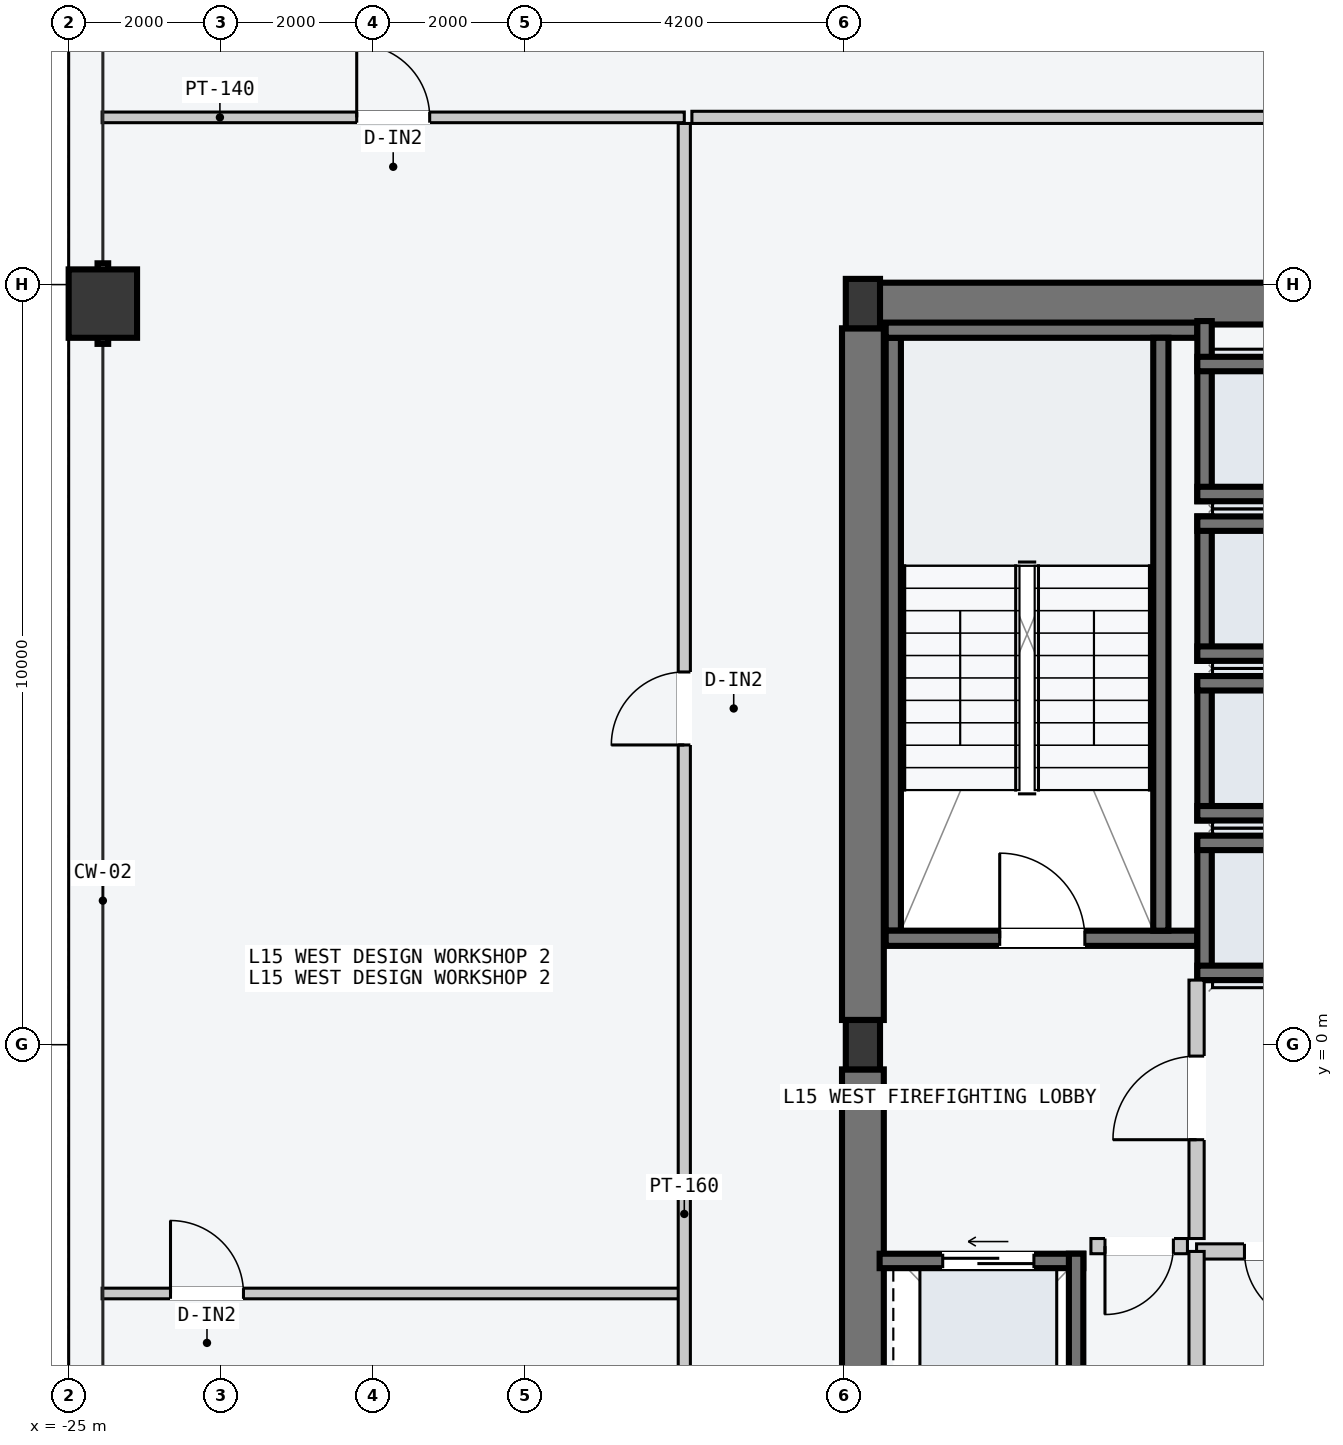
"""IFC4 building model, lengths in metres.
Left out: names, types, materials, properties, quantities, classifications, styles, units other than length and angle.
Written with IfcOpenShell. Run it as: python <this file> out.ifc"""

import sys

from ifc_helpers import new_model, si_unit, direction, frame, frame_2d, origin, origin_2d, place, context, subcontext, project, spatial, rectangle, hollow_rectangle, i_section, extrude, element, fill, save


model = new_model("IFC4")
c1 = context("Model", 3, precision=1e-05, world=origin(), true_north=direction((0.0, 1.0)))
c2 = subcontext(c1, "Body", "Model", "MODEL_VIEW")
j1 = project(units=[si_unit("LENGTHUNIT", "METRE"), si_unit("PLANEANGLEUNIT", "RADIAN")], contexts=[c1])
p1 = place(None, origin())
s1 = spatial("IfcSite", under=j1, at=p1, CompositionType="ELEMENT")
p2 = place(p1, origin())
s2 = spatial("IfcBuilding", under=s1, at=p2, CompositionType="ELEMENT")
p3 = place(p2, frame((0.0, 0.0, 60.0)))
s3 = spatial("IfcBuildingStorey", under=s2, at=p3, CompositionType="ELEMENT", Elevation=60.0)
p4 = place(p3, frame((-14.53, 9.75, -0.2), z_axis=(0.0, 0.0, 1.0), x_axis=(1.0, 0.0, 0.0)))
e1 = element("IfcWall", 1, at=p4, inside=s3, PredefinedType="SHEAR", context=c2, shape_type="SweptSolid", body=[
    extrude(rectangle(XDim=6.46, YDim=0.55, at=frame_2d((3.23, 0.0))), origin(), (0.0, 0.0, 1.0), 3.6),
])
for number, where, z_axis, x_axis in (
    (2, (-14.55, -9.425, -0.2), (0.0, 0.0, 1.0), (0.0, 1.0, 0.0)),
    (3, (-14.55, 0.325, -0.2), (0.0, 0.0, 1.0), (0.0, 1.0, 0.0)),
):
    element("IfcWall", number, at=place(p3, frame(where, z_axis=z_axis, x_axis=x_axis)), inside=s3, PredefinedType="SHEAR", context=c2, shape_type="SweptSolid", body=[
        extrude(rectangle(XDim=9.1, YDim=0.55, at=frame_2d((4.55, 0.0))), origin(), (0.0, 0.0, 1.0), 3.6),
    ])
p5 = place(p3, frame((-14.15, 1.5, -0.2), z_axis=(0.0, 0.0, 1.0), x_axis=(0.0, 1.0, 0.0)))
e4 = element("IfcWall", 4, at=p5, inside=s3, PredefinedType="SOLIDWALL", context=c2, shape_type="SweptSolid", body=[
    extrude(rectangle(XDim=7.8, YDim=0.2, at=frame_2d((3.9, 0.0))), origin(), (0.0, 0.0, 1.0), 3.6),
])
p6 = place(p3, frame((-14.25, 1.4, -0.2), z_axis=(0.0, 0.0, 1.0), x_axis=(1.0, 0.0, 0.0)))
e5 = element("IfcWall", 5, at=p6, inside=s3, PredefinedType="SOLIDWALL", context=c2, shape_type="SweptSolid", body=[
    extrude(rectangle(XDim=4.1, YDim=0.2, at=frame_2d((2.05, 0.0))), origin(), (0.0, 0.0, 1.0), 3.6),
])
p7 = place(p6, frame((1.5, 0.0, 0.2)))
e6 = element("IfcOpeningElement", 6, at=p7, cuts=e5, PredefinedType="OPENING", context=c2, shape_type="SweptSolid", body=[
    extrude(rectangle(XDim=1.12, YDim=2.18, at=frame_2d((0.56, 1.09))), frame((0.0, 0.11, 0.0), z_axis=(0.0, -1.0, 0.0), x_axis=(1.0, 0.0, 0.0)), (0.0, 0.0, 1.0), 0.22),
])
p8 = place(p3, frame((-14.25, 9.4, -0.2), z_axis=(0.0, 0.0, 1.0), x_axis=(1.0, 0.0, 0.0)))
e7 = element("IfcWall", 7, at=p8, inside=s3, PredefinedType="SOLIDWALL", context=c2, shape_type="SweptSolid", body=[
    extrude(rectangle(XDim=4.1, YDim=0.2, at=frame_2d((2.05, 0.0))), origin(), (0.0, 0.0, 1.0), 3.6),
])
p9 = place(p3, frame((-10.63, 1.5, -0.2), z_axis=(0.0, 0.0, 1.0), x_axis=(0.0, 1.0, 0.0)))
e8 = element("IfcWall", 8, at=p9, inside=s3, PredefinedType="SOLIDWALL", context=c2, shape_type="SweptSolid", body=[
    extrude(rectangle(XDim=7.8, YDim=0.2, at=frame_2d((3.9, 0.0))), origin(), (0.0, 0.0, 1.0), 3.6),
])
for number, where, z_axis, x_axis in (
    (9, (-14.55, 0.0, 0.0), (0.0, 0.0, 1.0), (1.0, 0.0, 0.0)),
    (10, (-14.55, 9.75, 0.0), (0.0, 0.0, 1.0), (1.0, 0.0, 0.0)),
):
    element("IfcColumn", number, at=place(p3, frame(where, z_axis=z_axis, x_axis=x_axis)), inside=s3, PredefinedType="COLUMN", context=c2, shape_type="SweptSolid", body=[
        extrude(i_section(OverallWidth=0.45, OverallDepth=0.65, WebThickness=0.025, FlangeThickness=0.04, at=origin_2d()), origin(), (0.0, 0.0, 1.0), 3.6),
    ])
p10 = place(p3, frame((-24.55, 9.75, 0.0), z_axis=(0.0, 0.0, 1.0), x_axis=(0.0, 1.0, 0.0)))
e11 = element("IfcColumn", 11, at=p10, inside=s3, PredefinedType="COLUMN", context=c2, shape_type="SweptSolid", body=[
    extrude(hollow_rectangle(XDim=0.9, YDim=0.9, WallThickness=0.045, at=origin_2d()), origin(), (0.0, 0.0, 1.0), 3.6),
])
p11 = place(p3, frame((-10.055, 0.85, -0.2), z_axis=(0.0, 0.0, 1.0), x_axis=(0.0, 1.0, 0.0)))
e12 = element("IfcWall", 12, at=p11, inside=s3, PredefinedType="SOLIDWALL", context=c2, shape_type="SweptSolid", body=[
    extrude(rectangle(XDim=1.9, YDim=0.19, at=frame_2d((0.95, 0.0))), origin(), (0.0, 0.0, 1.0), 3.6),
])
for number, where, z_axis, x_axis in (
    (13, (-10.15, 2.655, -0.2), (0.0, 0.0, 1.0), (1.0, 0.0, 0.0)),
    (14, (-10.15, 0.945, -0.2), (0.0, 0.0, 1.0), (1.0, 0.0, 0.0)),
):
    element("IfcWall", number, at=place(p3, frame(where, z_axis=z_axis, x_axis=x_axis)), inside=s3, PredefinedType="SOLIDWALL", context=c2, shape_type="SweptSolid", body=[
        extrude(rectangle(XDim=2.2, YDim=0.19, at=frame_2d((1.1, 0.0))), origin(), (0.0, 0.0, 1.0), 3.6),
    ])
p12 = place(p3, frame((-10.055, 2.95, -0.2), z_axis=(0.0, 0.0, 1.0), x_axis=(0.0, 1.0, 0.0)))
e15 = element("IfcWall", 15, at=p12, inside=s3, PredefinedType="SOLIDWALL", context=c2, shape_type="SweptSolid", body=[
    extrude(rectangle(XDim=1.9, YDim=0.19, at=frame_2d((0.95, 0.0))), origin(), (0.0, 0.0, 1.0), 3.6),
])
for number, where, z_axis, x_axis in (
    (16, (-10.15, 4.755, -0.2), (0.0, 0.0, 1.0), (1.0, 0.0, 0.0)),
    (17, (-10.15, 3.045, -0.2), (0.0, 0.0, 1.0), (1.0, 0.0, 0.0)),
):
    element("IfcWall", number, at=place(p3, frame(where, z_axis=z_axis, x_axis=x_axis)), inside=s3, PredefinedType="SOLIDWALL", context=c2, shape_type="SweptSolid", body=[
        extrude(rectangle(XDim=2.2, YDim=0.19, at=frame_2d((1.1, 0.0))), origin(), (0.0, 0.0, 1.0), 3.6),
    ])
p13 = place(p3, frame((-10.055, 5.05, -0.2), z_axis=(0.0, 0.0, 1.0), x_axis=(0.0, 1.0, 0.0)))
e18 = element("IfcWall", 18, at=p13, inside=s3, PredefinedType="SOLIDWALL", context=c2, shape_type="SweptSolid", body=[
    extrude(rectangle(XDim=1.9, YDim=0.19, at=frame_2d((0.95, 0.0))), origin(), (0.0, 0.0, 1.0), 3.6),
])
for number, where, z_axis, x_axis in (
    (19, (-10.15, 6.855, -0.2), (0.0, 0.0, 1.0), (1.0, 0.0, 0.0)),
    (20, (-10.15, 5.145, -0.2), (0.0, 0.0, 1.0), (1.0, 0.0, 0.0)),
):
    element("IfcWall", number, at=place(p3, frame(where, z_axis=z_axis, x_axis=x_axis)), inside=s3, PredefinedType="SOLIDWALL", context=c2, shape_type="SweptSolid", body=[
        extrude(rectangle(XDim=2.2, YDim=0.19, at=frame_2d((1.1, 0.0))), origin(), (0.0, 0.0, 1.0), 3.6),
    ])
p14 = place(p3, frame((-10.055, 7.15, -0.2), z_axis=(0.0, 0.0, 1.0), x_axis=(0.0, 1.0, 0.0)))
e21 = element("IfcWall", 21, at=p14, inside=s3, PredefinedType="SOLIDWALL", context=c2, shape_type="SweptSolid", body=[
    extrude(rectangle(XDim=2.37, YDim=0.19, at=frame_2d((1.185, 0.0))), origin(), (0.0, 0.0, 1.0), 3.6),
])
for number, where, z_axis, x_axis in (
    (22, (-10.15, 8.955, -0.2), (0.0, 0.0, 1.0), (1.0, 0.0, 0.0)),
    (23, (-10.15, 7.245, -0.2), (0.0, 0.0, 1.0), (1.0, 0.0, 0.0)),
):
    element("IfcWall", number, at=place(p3, frame(where, z_axis=z_axis, x_axis=x_axis)), inside=s3, PredefinedType="SOLIDWALL", context=c2, shape_type="SweptSolid", body=[
        extrude(rectangle(XDim=2.2, YDim=0.19, at=frame_2d((1.1, 0.0))), origin(), (0.0, 0.0, 1.0), 3.6),
    ])
p15 = place(p3, frame((-14.33, -2.845, -0.2), z_axis=(0.0, 0.0, 1.0), x_axis=(1.0, 0.0, 0.0)))
e24 = element("IfcWall", 24, at=p15, inside=s3, PredefinedType="SOLIDWALL", context=c2, shape_type="SweptSolid", body=[
    extrude(rectangle(XDim=2.68, YDim=0.19, at=frame_2d((1.34, 0.0))), origin(), (0.0, 0.0, 1.0), 3.6),
])
p16 = place(p15, frame((0.83, 0.0, 0.2)))
e25 = element("IfcOpeningElement", 25, at=p16, cuts=e24, PredefinedType="OPENING", context=c2, shape_type="SweptSolid", body=[
    extrude(rectangle(XDim=1.2, YDim=2.2, at=frame_2d((0.6, 1.1))), frame((0.0, 0.105, 0.0), z_axis=(0.0, -1.0, 0.0), x_axis=(1.0, 0.0, 0.0)), (0.0, 0.0, 1.0), 0.21),
])
p17 = place(p3, frame((-11.745, -5.35, -0.2), z_axis=(0.0, 0.0, 1.0), x_axis=(0.0, 1.0, 0.0)))
e26 = element("IfcWall", 26, at=p17, inside=s3, PredefinedType="SOLIDWALL", context=c2, shape_type="SweptSolid", body=[
    extrude(rectangle(XDim=2.6, YDim=0.19, at=frame_2d((1.3, 0.0))), origin(), (0.0, 0.0, 1.0), 3.6),
])
p18 = place(p3, frame((-10.16, -2.55, 0.0), z_axis=(0.0, 0.0, 1.0), x_axis=(0.0, 1.0, 0.0)))
e27 = element("IfcWall", 27, at=p18, inside=s3, PredefinedType="PARTITIONING", context=c2, shape_type="SweptSolid", body=[
    extrude(rectangle(XDim=3.4, YDim=0.2, at=frame_2d((1.7, 0.0))), origin(), (0.0, 0.0, 1.0), 3.4),
])
p19 = place(p18, frame((1.3, 0.0, 0.0)))
e28 = element("IfcOpeningElement", 28, at=p19, cuts=e27, PredefinedType="OPENING", context=c2, shape_type="SweptSolid", body=[
    extrude(rectangle(XDim=1.1, YDim=2.15, at=frame_2d((0.55, 1.075))), frame((0.0, 0.11, 0.0), z_axis=(0.0, -1.0, 0.0), x_axis=(1.0, 0.0, 0.0)), (0.0, 0.0, 1.0), 0.22),
])
p20 = place(p3, frame((-10.28, -2.65, 0.0), z_axis=(0.0, 0.0, 1.0), x_axis=(-1.0, 0.0, 0.0)))
e29 = element("IfcWall", 29, at=p20, inside=s3, PredefinedType="PARTITIONING", context=c2, shape_type="SweptSolid", body=[
    extrude(rectangle(XDim=1.27, YDim=0.2, at=frame_2d((0.635, 0.0))), origin(), (0.0, 0.0, 1.0), 3.4),
])
p21 = place(p20, frame((0.185, 0.0, 0.0)))
e30 = element("IfcOpeningElement", 30, at=p21, cuts=e29, PredefinedType="OPENING", context=c2, shape_type="SweptSolid", body=[
    extrude(rectangle(XDim=0.9, YDim=2.15, at=frame_2d((0.45, 1.075))), frame((0.0, 0.11, 0.0), z_axis=(0.0, -1.0, 0.0), x_axis=(1.0, 0.0, 0.0)), (0.0, 0.0, 1.0), 0.22),
])
p22 = place(p3, frame((-7.96, -2.72, 0.0), z_axis=(0.0, 0.0, 1.0), x_axis=(-1.0, 0.0, 0.0)))
e31 = element("IfcWall", 31, at=p22, inside=s3, PredefinedType="PARTITIONING", context=c2, shape_type="SweptSolid", body=[
    extrude(rectangle(XDim=2.2, YDim=0.2, at=frame_2d((1.1, 0.0))), origin(), (0.0, 0.0, 1.0), 3.4),
])
p23 = place(p22, frame((0.62, 0.0, 0.0)))
e32 = element("IfcOpeningElement", 32, at=p23, cuts=e31, PredefinedType="OPENING", context=c2, shape_type="SweptSolid", body=[
    extrude(rectangle(XDim=0.95, YDim=2.1, at=frame_2d((0.475, 1.05))), frame((0.0, 0.11, 0.0), z_axis=(0.0, -1.0, 0.0), x_axis=(1.0, 0.0, 0.0)), (0.0, 0.0, 1.0), 0.22),
])
p24 = place(p3, frame((-10.16, -5.16, 0.0), z_axis=(0.0, 0.0, 1.0), x_axis=(0.0, 1.0, 0.0)))
e33 = element("IfcWall", 33, at=p24, inside=s3, PredefinedType="PARTITIONING", context=c2, shape_type="SweptSolid", body=[
    extrude(rectangle(XDim=2.44, YDim=0.2, at=frame_2d((1.22, 0.0))), origin(), (0.0, 0.0, 1.0), 3.4),
])
p25 = place(p3, frame((-16.8, 12.2, 0.0), z_axis=(0.0, 0.0, 1.0), x_axis=(1.0, 0.0, 0.0)))
e34 = element("IfcWall", 34, at=p25, inside=s3, PredefinedType="PARTITIONING", context=c2, shape_type="SweptSolid", body=[
    extrude(rectangle(XDim=33.6, YDim=0.16, at=frame_2d((16.8, 0.0))), origin(), (0.0, 0.0, 1.0), 3.4),
])
p26 = place(p25, frame((16.1, 0.0, 0.0)))
e35 = element("IfcOpeningElement", 35, at=p26, cuts=e34, PredefinedType="OPENING", context=c2, shape_type="SweptSolid", body=[
    extrude(rectangle(XDim=1.4, YDim=2.2, at=frame_2d((0.7, 1.1))), frame((0.0, 0.09, 0.0), z_axis=(0.0, -1.0, 0.0), x_axis=(1.0, 0.0, 0.0)), (0.0, 0.0, 1.0), 0.18),
])
p27 = place(p3, frame((-24.56, 12.2, 0.0), z_axis=(0.0, 0.0, 1.0), x_axis=(1.0, 0.0, 0.0)))
e36 = element("IfcWall", 36, at=p27, inside=s3, PredefinedType="PARTITIONING", context=c2, shape_type="SweptSolid", body=[
    extrude(rectangle(XDim=7.66, YDim=0.14, at=frame_2d((3.83, 0.0))), origin(), (0.0, 0.0, 1.0), 3.4),
])
p28 = place(p27, frame((3.35, 0.0, 0.0)))
e37 = element("IfcOpeningElement", 37, at=p28, cuts=e36, PredefinedType="OPENING", context=c2, shape_type="SweptSolid", body=[
    extrude(rectangle(XDim=0.96, YDim=2.18, at=frame_2d((0.48, 1.09))), frame((0.0, 0.08, 0.0), z_axis=(0.0, -1.0, 0.0), x_axis=(1.0, 0.0, 0.0)), (0.0, 0.0, 1.0), 0.16),
])
p29 = place(p3, frame((-24.56, -3.273, 0.0), z_axis=(0.0, 0.0, 1.0), x_axis=(1.0, 0.0, 0.0)))
e38 = element("IfcWall", 38, at=p29, inside=s3, PredefinedType="PARTITIONING", context=c2, shape_type="SweptSolid", body=[
    extrude(rectangle(XDim=7.6, YDim=0.14, at=frame_2d((3.8, 0.0))), origin(), (0.0, 0.0, 1.0), 2.95),
])
p30 = place(p29, frame((0.9, 0.0, 0.0)))
e39 = element("IfcOpeningElement", 39, at=p30, cuts=e38, PredefinedType="OPENING", context=c2, shape_type="SweptSolid", body=[
    extrude(rectangle(XDim=0.96, YDim=2.18, at=frame_2d((0.48, 1.09))), frame((0.0, 0.08, 0.0), z_axis=(0.0, -1.0, 0.0), x_axis=(1.0, 0.0, 0.0)), (0.0, 0.0, 1.0), 0.16),
])
p31 = place(p3, frame((-16.9, -14.42, 0.0), z_axis=(0.0, 0.0, 1.0), x_axis=(0.0, 1.0, 0.0)))
e40 = element("IfcWall", 40, at=p31, inside=s3, PredefinedType="PARTITIONING", context=c2, shape_type="SweptSolid", body=[
    extrude(rectangle(XDim=26.54, YDim=0.16, at=frame_2d((13.27, 0.0))), origin(), (0.0, 0.0, 1.0), 3.4),
])
p32 = place(p31, frame((5.123, 0.0, 0.0)))
e41 = element("IfcOpeningElement", 41, at=p32, cuts=e40, PredefinedType="OPENING", context=c2, shape_type="SweptSolid", body=[
    extrude(rectangle(XDim=0.9, YDim=2.15, at=frame_2d((0.45, 1.075))), frame((0.0, 0.09, 0.0), z_axis=(0.0, -1.0, 0.0), x_axis=(1.0, 0.0, 0.0)), (0.0, 0.0, 1.0), 0.18),
])
p33 = place(p31, frame((18.363, 0.0, 0.0)))
e42 = element("IfcOpeningElement", 42, at=p33, cuts=e40, PredefinedType="OPENING", context=c2, shape_type="SweptSolid", body=[
    extrude(rectangle(XDim=0.96, YDim=2.18, at=frame_2d((0.48, 1.09))), frame((0.0, 0.09, 0.0), z_axis=(0.0, -1.0, 0.0), x_axis=(1.0, 0.0, 0.0)), (0.0, 0.0, 1.0), 0.18),
])
p34 = place(p7, origin())
e43 = element("IfcDoor", 43, at=p34, inside=s3, OperationType="SINGLE_SWING_LEFT", PredefinedType="DOOR", context=c2, shape_type="SweptSolid", body=[
    extrude(rectangle(XDim=1.12, YDim=2.18, at=frame_2d((0.56, 1.09))), frame((0.0, 0.025, 0.0), z_axis=(0.0, -1.0, 0.0), x_axis=(1.0, 0.0, 0.0)), (0.0, 0.0, 1.0), 0.05),
])
fill(e6, e43)
p35 = place(p16, origin())
e44 = element("IfcDoor", 44, at=p35, inside=s3, OperationType="SLIDING_TO_LEFT", PredefinedType="DOOR", context=c2, shape_type="SweptSolid", body=[
    extrude(rectangle(XDim=1.2, YDim=2.2, at=frame_2d((0.6, 1.1))), frame((0.0, 0.025, 0.0), z_axis=(0.0, -1.0, 0.0), x_axis=(1.0, 0.0, 0.0)), (0.0, 0.0, 1.0), 0.05),
])
fill(e25, e44)
p36 = place(p19, origin())
e45 = element("IfcDoor", 45, at=p36, inside=s3, OperationType="SINGLE_SWING_LEFT", PredefinedType="DOOR", context=c2, shape_type="SweptSolid", body=[
    extrude(rectangle(XDim=1.1, YDim=2.15, at=frame_2d((0.55, 1.075))), frame((0.0, 0.025, 0.0), z_axis=(0.0, -1.0, 0.0), x_axis=(1.0, 0.0, 0.0)), (0.0, 0.0, 1.0), 0.05),
])
fill(e28, e45)
p37 = place(p21, origin())
e46 = element("IfcDoor", 46, at=p37, inside=s3, OperationType="SINGLE_SWING_RIGHT", PredefinedType="DOOR", context=c2, shape_type="SweptSolid", body=[
    extrude(rectangle(XDim=0.9, YDim=2.15, at=frame_2d((0.45, 1.075))), frame((0.0, 0.025, 0.0), z_axis=(0.0, -1.0, 0.0), x_axis=(1.0, 0.0, 0.0)), (0.0, 0.0, 1.0), 0.05),
])
fill(e30, e46)
p38 = place(p23, origin())
e47 = element("IfcDoor", 47, at=p38, inside=s3, OperationType="SINGLE_SWING_LEFT", PredefinedType="DOOR", context=c2, shape_type="SweptSolid", body=[
    extrude(rectangle(XDim=0.95, YDim=2.1, at=frame_2d((0.475, 1.05))), frame((0.0, 0.025, 0.0), z_axis=(0.0, -1.0, 0.0), x_axis=(1.0, 0.0, 0.0)), (0.0, 0.0, 1.0), 0.05),
])
fill(e32, e47)
p39 = place(p28, origin())
e48 = element("IfcDoor", 48, at=p39, inside=s3, OperationType="SINGLE_SWING_LEFT", PredefinedType="DOOR", context=c2, shape_type="SweptSolid", body=[
    extrude(rectangle(XDim=0.96, YDim=2.18, at=frame_2d((0.48, 1.09))), frame((0.0, 0.025, 0.0), z_axis=(0.0, -1.0, 0.0), x_axis=(1.0, 0.0, 0.0)), (0.0, 0.0, 1.0), 0.05),
])
fill(e37, e48)
p40 = place(p30, origin())
e49 = element("IfcDoor", 49, at=p40, inside=s3, OperationType="SINGLE_SWING_LEFT", PredefinedType="DOOR", context=c2, shape_type="SweptSolid", body=[
    extrude(rectangle(XDim=0.96, YDim=2.18, at=frame_2d((0.48, 1.09))), frame((0.0, 0.025, 0.0), z_axis=(0.0, -1.0, 0.0), x_axis=(1.0, 0.0, 0.0)), (0.0, 0.0, 1.0), 0.05),
])
fill(e39, e49)
p41 = place(p33, origin())
e50 = element("IfcDoor", 50, at=p41, inside=s3, OperationType="SINGLE_SWING_LEFT", PredefinedType="DOOR", context=c2, shape_type="SweptSolid", body=[
    extrude(rectangle(XDim=0.96, YDim=2.18, at=frame_2d((0.48, 1.09))), frame((0.0, 0.025, 0.0), z_axis=(0.0, -1.0, 0.0), x_axis=(1.0, 0.0, 0.0)), (0.0, 0.0, 1.0), 0.05),
])
fill(e42, e50)
save(model, sys.argv[1])
